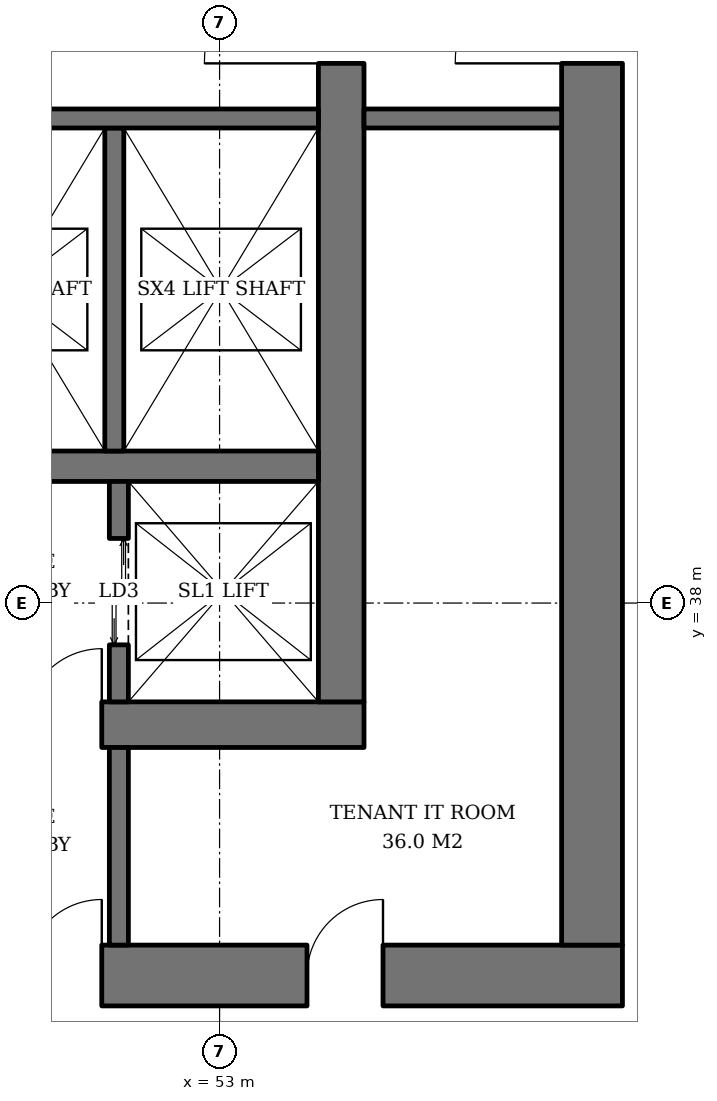
"""IFC4 building model, lengths in metres.
Left out: names, types, materials, properties, quantities, classifications, styles, units other than length and angle.
Written with IfcOpenShell. Run it as: python <this file> out.ifc"""

import sys

from ifc_helpers import new_model, si_unit, direction, frame, frame_2d, origin, place, context, subcontext, project, spatial, rectangle, extrude, element, fill, save


model = new_model("IFC4")
c1 = context("Model", 3, precision=1e-05, world=origin(), true_north=direction((0.0, 1.0)))
c2 = subcontext(c1, "Body", "Model", "MODEL_VIEW")
j1 = project(units=[si_unit("LENGTHUNIT", "METRE"), si_unit("PLANEANGLEUNIT", "RADIAN")], contexts=[c1])
p1 = place(None, origin())
s1 = spatial("IfcSite", under=j1, at=p1, CompositionType="ELEMENT")
p2 = place(p1, origin())
s2 = spatial("IfcBuilding", under=s1, at=p2, CompositionType="ELEMENT")
p3 = place(p2, frame((0.0, 0.0, 66.6)))
s3 = spatial("IfcBuildingStorey", under=s2, at=p3, CompositionType="ELEMENT", Elevation=66.6)
p4 = place(p3, frame((35.1, 36.4, 0.0), z_axis=(0.0, 0.0, 1.0), x_axis=(1.0, 0.0, 0.0)))
e1 = element("IfcWall", 1, at=p4, inside=s3, PredefinedType="SHEAR", context=c2, shape_type="SweptSolid", body=[
    extrude(rectangle(XDim=19.8, YDim=0.6, at=frame_2d((9.9, 0.0))), origin(), (0.0, 0.0, 1.0), 3.8),
])
p5 = place(p4, frame((3.9, 0.0, 0.0)))
e2 = element("IfcOpeningElement", 2, at=p5, cuts=e1, PredefinedType="OPENING", context=c2, shape_type="SweptSolid", body=[
    extrude(rectangle(XDim=1.0, YDim=2.1, at=frame_2d((0.5, 1.05))), frame((0.0, 0.31, 0.0), z_axis=(0.0, -1.0, 0.0), x_axis=(1.0, 0.0, 0.0)), (0.0, 0.0, 1.0), 0.62),
])
p6 = place(p4, frame((15.35, 0.0, 0.0)))
e3 = element("IfcOpeningElement", 3, at=p6, cuts=e1, PredefinedType="OPENING", context=c2, shape_type="SweptSolid", body=[
    extrude(rectangle(XDim=1.0, YDim=2.1, at=frame_2d((0.5, 1.05))), frame((0.0, 0.31, 0.0), z_axis=(0.0, -1.0, 0.0), x_axis=(1.0, 0.0, 0.0)), (0.0, 0.0, 1.0), 0.62),
])
p7 = place(p3, frame((54.6, 36.7, 0.0), z_axis=(0.0, 0.0, 1.0), x_axis=(0.0, 1.0, 0.0)))
e4 = element("IfcWall", 4, at=p7, inside=s3, PredefinedType="SHEAR", context=c2, shape_type="SweptSolid", body=[
    extrude(rectangle(XDim=18.6, YDim=0.6, at=frame_2d((9.3, 0.0))), origin(), (0.0, 0.0, 1.0), 3.8),
])
p8 = place(p7, frame((8.4, 0.0, 0.0)))
e5 = element("IfcOpeningElement", 5, at=p8, cuts=e4, PredefinedType="OPENING", context=c2, shape_type="SweptSolid", body=[
    extrude(rectangle(XDim=1.8, YDim=2.4, at=frame_2d((0.9, 1.2))), frame((0.0, 0.31, 0.0), z_axis=(0.0, -1.0, 0.0), x_axis=(1.0, 0.0, 0.0)), (0.0, 0.0, 1.0), 0.62),
])
p9 = place(p3, frame((31.7, 33.1, 0.0), z_axis=(0.0, 0.0, 1.0), x_axis=(1.0, 0.0, 0.0)))
e6 = element("IfcWall", 6, at=p9, inside=s3, PredefinedType="SHEAR", context=c2, shape_type="SweptSolid", body=[
    extrude(rectangle(XDim=26.6, YDim=0.8, at=frame_2d((13.3, 0.0))), origin(), (0.0, 0.0, 1.0), 3.8),
])
p10 = place(p9, frame((7.3, 0.0, 0.0)))
e7 = element("IfcOpeningElement", 7, at=p10, cuts=e6, PredefinedType="OPENING", context=c2, shape_type="SweptSolid", body=[
    extrude(rectangle(XDim=1.0, YDim=2.1, at=frame_2d((0.5, 1.05))), frame((0.0, 0.41, 0.0), z_axis=(0.0, -1.0, 0.0), x_axis=(1.0, 0.0, 0.0)), (0.0, 0.0, 1.0), 0.82),
])
p11 = place(p9, frame((18.75, 0.0, 0.0)))
e8 = element("IfcOpeningElement", 8, at=p11, cuts=e6, PredefinedType="OPENING", context=c2, shape_type="SweptSolid", body=[
    extrude(rectangle(XDim=1.0, YDim=2.1, at=frame_2d((0.5, 1.05))), frame((0.0, 0.41, 0.0), z_axis=(0.0, -1.0, 0.0), x_axis=(1.0, 0.0, 0.0)), (0.0, 0.0, 1.0), 0.82),
])
p12 = place(p9, frame((3.25, 0.0, 0.0)))
e9 = element("IfcOpeningElement", 9, at=p12, cuts=e6, PredefinedType="OPENING", context=c2, shape_type="SweptSolid", body=[
    extrude(rectangle(XDim=1.0, YDim=2.1, at=frame_2d((0.5, 1.05))), frame((0.0, 0.41, 0.0), z_axis=(0.0, -1.0, 0.0), x_axis=(1.0, 0.0, 0.0)), (0.0, 0.0, 1.0), 0.82),
])
p13 = place(p9, frame((10.42, 0.0, 0.0)))
e10 = element("IfcOpeningElement", 10, at=p13, cuts=e6, PredefinedType="OPENING", context=c2, shape_type="SweptSolid", body=[
    extrude(rectangle(XDim=1.0, YDim=2.1, at=frame_2d((0.5, 1.05))), frame((0.0, 0.41, 0.0), z_axis=(0.0, -1.0, 0.0), x_axis=(1.0, 0.0, 0.0)), (0.0, 0.0, 1.0), 0.82),
])
p14 = place(p9, frame((14.46, 0.0, 0.0)))
e11 = element("IfcOpeningElement", 11, at=p14, cuts=e6, PredefinedType="OPENING", context=c2, shape_type="SweptSolid", body=[
    extrude(rectangle(XDim=1.0, YDim=2.1, at=frame_2d((0.5, 1.05))), frame((0.0, 0.41, 0.0), z_axis=(0.0, -1.0, 0.0), x_axis=(1.0, 0.0, 0.0)), (0.0, 0.0, 1.0), 0.82),
])
p15 = place(p9, frame((22.45, 0.0, 0.0)))
e12 = element("IfcOpeningElement", 12, at=p15, cuts=e6, PredefinedType="OPENING", context=c2, shape_type="SweptSolid", body=[
    extrude(rectangle(XDim=1.0, YDim=2.1, at=frame_2d((0.5, 1.05))), frame((0.0, 0.41, 0.0), z_axis=(0.0, -1.0, 0.0), x_axis=(1.0, 0.0, 0.0)), (0.0, 0.0, 1.0), 0.82),
])
p16 = place(p3, frame((57.9, 33.5, 0.0), z_axis=(0.0, 0.0, 1.0), x_axis=(0.0, 1.0, 0.0)))
e13 = element("IfcWall", 13, at=p16, inside=s3, PredefinedType="SHEAR", context=c2, shape_type="SweptSolid", body=[
    extrude(rectangle(XDim=25.0, YDim=0.8, at=frame_2d((12.5, 0.0))), origin(), (0.0, 0.0, 1.0), 3.8),
])
p17 = place(p16, frame((11.6, 0.0, 0.0)))
e14 = element("IfcOpeningElement", 14, at=p17, cuts=e13, PredefinedType="OPENING", context=c2, shape_type="SweptSolid", body=[
    extrude(rectangle(XDim=1.8, YDim=2.4, at=frame_2d((0.9, 1.2))), frame((0.0, 0.41, 0.0), z_axis=(0.0, -1.0, 0.0), x_axis=(1.0, 0.0, 0.0)), (0.0, 0.0, 1.0), 0.82),
])
p18 = place(p3, frame((35.7, 39.8, 0.0), z_axis=(0.0, 0.0, 1.0), x_axis=(1.0, 0.0, 0.0)))
e15 = element("IfcWall", 15, at=p18, inside=s3, PredefinedType="SHEAR", context=c2, shape_type="SweptSolid", body=[
    extrude(rectangle(XDim=18.6, YDim=0.4, at=frame_2d((9.3, 0.0))), origin(), (0.0, 0.0, 1.0), 3.8),
])
p19 = place(p3, frame((51.675, 36.7, 0.0), z_axis=(0.0, 0.0, 1.0), x_axis=(0.0, 1.0, 0.0)))
e16 = element("IfcWall", 16, at=p19, inside=s3, PredefinedType="SHEAR", context=c2, shape_type="SweptSolid", body=[
    extrude(rectangle(XDim=2.9, YDim=0.25, at=frame_2d((1.45, 0.0))), origin(), (0.0, 0.0, 1.0), 3.8),
])
p20 = place(p19, frame((0.75, 0.0, 0.0)))
e17 = element("IfcOpeningElement", 17, at=p20, cuts=e16, PredefinedType="OPENING", context=c2, shape_type="SweptSolid", body=[
    extrude(rectangle(XDim=1.4, YDim=2.4, at=frame_2d((0.7, 1.2))), frame((0.0, 0.135, 0.0), z_axis=(0.0, -1.0, 0.0), x_axis=(1.0, 0.0, 0.0)), (0.0, 0.0, 1.0), 0.27),
])
p21 = place(p3, frame((51.615, 44.25, 0.0), z_axis=(0.0, 0.0, 1.0), x_axis=(0.0, -1.0, 0.0)))
e18 = element("IfcWall", 18, at=p21, inside=s3, PredefinedType="SHEAR", context=c2, shape_type="SweptSolid", body=[
    extrude(rectangle(XDim=4.25, YDim=0.25, at=frame_2d((2.125, 0.0))), origin(), (0.0, 0.0, 1.0), 3.8),
])
p22 = place(p3, frame((48.93, 44.375, 0.0), z_axis=(0.0, 0.0, 1.0), x_axis=(1.0, 0.0, 0.0)))
e19 = element("IfcWall", 19, at=p22, inside=s3, PredefinedType="SHEAR", context=c2, shape_type="SweptSolid", body=[
    extrude(rectangle(XDim=5.37, YDim=0.25, at=frame_2d((2.685, 0.0))), origin(), (0.0, 0.0, 1.0), 3.8),
])
for number, where, z_axis, x_axis in (
    (20, (54.9, 44.375, 0.0), (0.0, 0.0, 1.0), (1.0, 0.0, 0.0)),
    (21, (51.675, 33.5, 0.0), (0.0, 0.0, 1.0), (0.0, 1.0, 0.0)),
):
    element("IfcWall", number, at=place(p3, frame(where, z_axis=z_axis, x_axis=x_axis)), inside=s3, PredefinedType="SOLIDWALL", context=c2, shape_type="SweptSolid", body=[
        extrude(rectangle(XDim=2.6, YDim=0.25, at=frame_2d((1.3, 0.0))), origin(), (0.0, 0.0, 1.0), 3.62),
    ])
p23 = place(p20, origin())
e22 = element("IfcDoor", 22, at=p23, inside=s3, OperationType="DOUBLE_DOOR_SLIDING", PredefinedType="DOOR", context=c2, shape_type="SweptSolid", body=[
    extrude(rectangle(XDim=1.4, YDim=2.4, at=frame_2d((0.7, 1.2))), frame((0.0, 0.025, 0.0), z_axis=(0.0, -1.0, 0.0), x_axis=(1.0, 0.0, 0.0)), (0.0, 0.0, 1.0), 0.05),
])
fill(e17, e22)
p24 = place(p8, origin())
e23 = element("IfcDoor", 23, at=p24, inside=s3, OperationType="DOUBLE_DOOR_SINGLE_SWING", PredefinedType="DOOR", context=c2, shape_type="SweptSolid", body=[
    extrude(rectangle(XDim=1.8, YDim=2.4, at=frame_2d((0.9, 1.2))), frame((0.0, 0.025, 0.0), z_axis=(0.0, -1.0, 0.0), x_axis=(1.0, 0.0, 0.0)), (0.0, 0.0, 1.0), 0.05),
])
fill(e5, e23)
p25 = place(p6, origin())
e24 = element("IfcDoor", 24, at=p25, inside=s3, OperationType="SINGLE_SWING_RIGHT", PredefinedType="DOOR", context=c2, shape_type="SweptSolid", body=[
    extrude(rectangle(XDim=1.0, YDim=2.1, at=frame_2d((0.5, 1.05))), frame((0.0, 0.025, 0.0), z_axis=(0.0, -1.0, 0.0), x_axis=(1.0, 0.0, 0.0)), (0.0, 0.0, 1.0), 0.05),
])
fill(e3, e24)
p26 = place(p17, origin())
e25 = element("IfcDoor", 25, at=p26, inside=s3, OperationType="DOUBLE_DOOR_SINGLE_SWING", PredefinedType="DOOR", context=c2, shape_type="SweptSolid", body=[
    extrude(rectangle(XDim=1.8, YDim=2.4, at=frame_2d((0.9, 1.2))), frame((0.0, 0.025, 0.0), z_axis=(0.0, -1.0, 0.0), x_axis=(1.0, 0.0, 0.0)), (0.0, 0.0, 1.0), 0.05),
])
fill(e14, e25)
p27 = place(p11, origin())
e26 = element("IfcDoor", 26, at=p27, inside=s3, OperationType="SINGLE_SWING_RIGHT", PredefinedType="DOOR", context=c2, shape_type="SweptSolid", body=[
    extrude(rectangle(XDim=1.0, YDim=2.1, at=frame_2d((0.5, 1.05))), frame((0.0, 0.025, 0.0), z_axis=(0.0, -1.0, 0.0), x_axis=(1.0, 0.0, 0.0)), (0.0, 0.0, 1.0), 0.05),
])
fill(e8, e26)
p28 = place(p15, origin())
e27 = element("IfcDoor", 27, at=p28, inside=s3, OperationType="SINGLE_SWING_RIGHT", PredefinedType="DOOR", context=c2, shape_type="SweptSolid", body=[
    extrude(rectangle(XDim=1.0, YDim=2.1, at=frame_2d((0.5, 1.05))), frame((0.0, 0.39, 0.0), z_axis=(0.0, -1.0, 0.0), x_axis=(1.0, 0.0, 0.0)), (0.0, 0.0, 1.0), 0.05),
])
fill(e12, e27)
save(model, sys.argv[1])
